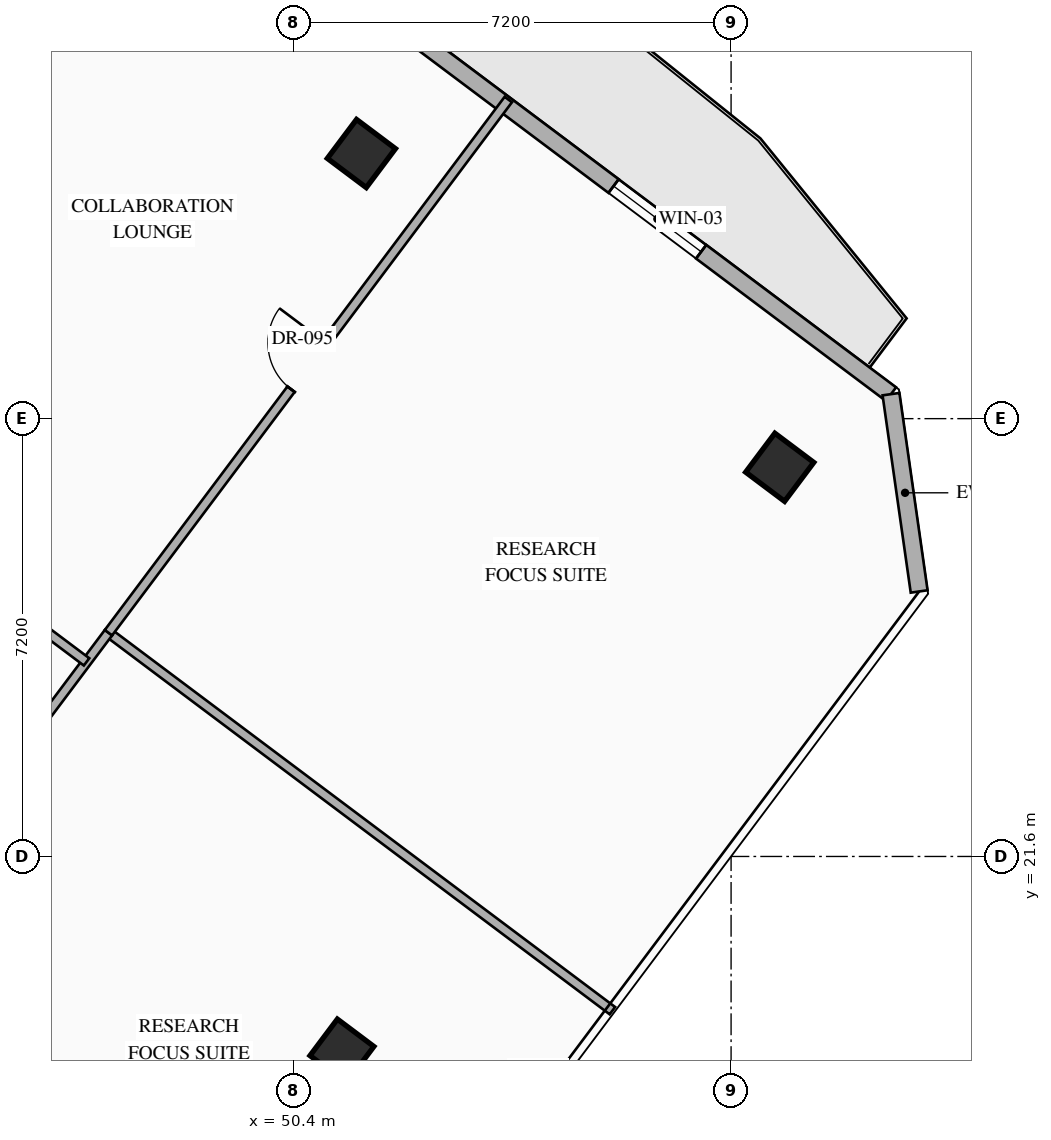
"""IFC4 building model, lengths in metres.
Left out: names, types, materials, properties, quantities, classifications, styles, units other than length and angle.
Written with IfcOpenShell. Run it as: python <this file> out.ifc"""

import sys

from ifc_helpers import new_model, si_unit, direction, frame, frame_2d, origin, origin_2d, place, context, subcontext, project, spatial, rectangle, hollow_rectangle, extrude, element, fill, save


model = new_model("IFC4")
c1 = context("Model", 3, precision=1e-05, world=origin(), true_north=direction((0.0, 1.0)))
c2 = subcontext(c1, "Body", "Model", "MODEL_VIEW")
j1 = project(units=[si_unit("LENGTHUNIT", "METRE"), si_unit("PLANEANGLEUNIT", "RADIAN")], contexts=[c1])
p1 = place(None, origin())
s1 = spatial("IfcSite", under=j1, at=p1, CompositionType="ELEMENT")
p2 = place(p1, origin())
s2 = spatial("IfcBuilding", under=s1, at=p2, CompositionType="ELEMENT")
p3 = place(p2, frame((0.0, 0.0, 174.45)))
s3 = spatial("IfcBuildingStorey", under=s2, at=p3, CompositionType="ELEMENT", Elevation=174.45)
for number, where, z_axis, x_axis in (
    (1, (51.52, 33.16, 0.0), (0.0, 0.0, 1.0), (0.8, -0.6, 0.0)),
    (2, (58.4, 28.0, 0.0), (0.0, 0.0, 1.0), (0.8, -0.6, 0.0)),
):
    element("IfcColumn", number, at=place(p3, frame(where, z_axis=z_axis, x_axis=x_axis)), inside=s3, PredefinedType="COLUMN", context=c2, shape_type="SweptSolid", body=[
        extrude(hollow_rectangle(XDim=0.8, YDim=0.8, WallThickness=0.032, at=origin_2d()), origin(), (0.0, 0.0, 1.0), 3.6),
    ])
p4 = place(p3, frame((51.2, 18.4, 0.0), z_axis=(0.0, 0.0, 1.0), x_axis=(0.799999996291, -0.600000004945, 0.0)))
e3 = element("IfcColumn", 3, at=p4, inside=s3, PredefinedType="COLUMN", context=c2, shape_type="SweptSolid", body=[
    extrude(hollow_rectangle(XDim=0.75, YDim=0.75, WallThickness=0.028, at=origin_2d()), origin(), (0.0, 0.0, 1.0), 3.6),
])
p5 = place(p3, frame((44.86, 40.73, 0.0), z_axis=(0.0, 0.0, 1.0), x_axis=(0.800007624502, -0.599989833863, 0.0)))
e4 = element("IfcWall", 4, at=p5, inside=s3, PredefinedType="STANDARD", context=c2, shape_type="SweptSolid", body=[
    extrude(rectangle(XDim=19.212, YDim=0.28, at=frame_2d((9.606, 0.0))), origin(), (0.0, 0.0, 1.0), 3.35),
])
p6 = place(p5, frame((1.755, 0.0, 0.0)))
e5 = element("IfcOpeningElement", 5, at=p6, cuts=e4, PredefinedType="OPENING", context=c2, shape_type="SweptSolid", body=[
    extrude(rectangle(XDim=1.1, YDim=2.2, at=frame_2d((0.55, 1.1))), frame((0.0, 0.15, 0.0), z_axis=(0.0, -1.0, 0.0), x_axis=(1.0, 0.0, 0.0)), (0.0, 0.0, 1.0), 0.3),
])
p7 = place(p5, frame((13.509, 0.0, 0.85)))
e6 = element("IfcOpeningElement", 6, at=p7, cuts=e4, PredefinedType="OPENING", context=c2, shape_type="SweptSolid", body=[
    extrude(rectangle(XDim=1.8, YDim=2.1, at=frame_2d((0.9, 1.05))), frame((0.0, 0.15, 0.0), z_axis=(0.0, -1.0, 0.0), x_axis=(1.0, 0.0, 0.0)), (0.0, 0.0, 1.0), 0.3),
])
p8 = place(p3, frame((60.23, 29.203, 0.0), z_axis=(0.0, 0.0, 1.0), x_axis=(0.141296221922, -0.989967361922, 0.0)))
e7 = element("IfcWall", 7, at=p8, inside=s3, PredefinedType="STANDARD", context=c2, shape_type="SweptSolid", body=[
    extrude(rectangle(XDim=3.278, YDim=0.28, at=frame_2d((1.639, 0.0))), origin(), (0.0, 0.0, 1.0), 3.35),
])
p9 = place(p3, frame((47.36, 25.28, 0.0), z_axis=(0.0, 0.0, 1.0), x_axis=(0.799991516197, -0.600011311571, 0.0)))
e8 = element("IfcWall", 8, at=p9, inside=s3, PredefinedType="PARTITIONING", context=c2, shape_type="SweptSolid", body=[
    extrude(rectangle(XDim=10.36, YDim=0.15, at=frame_2d((5.18, 0.0))), origin(), (0.0, 0.0, 1.0), 3.35),
])
p10 = place(p3, frame((41.87, 17.96, 0.0), z_axis=(0.0, 0.0, 1.0), x_axis=(0.599995730889, 0.800003201816, 0.0)))
e9 = element("IfcWall", 9, at=p10, inside=s3, PredefinedType="PARTITIONING", context=c2, shape_type="SweptSolid", body=[
    extrude(rectangle(XDim=9.15, YDim=0.15, at=frame_2d((4.575, 0.0))), origin(), (0.0, 0.0, 1.0), 3.35),
])
p11 = place(p10, frame((4.1, 0.0, 0.0)))
e10 = element("IfcOpeningElement", 10, at=p11, cuts=e9, PredefinedType="OPENING", context=c2, shape_type="SweptSolid", body=[
    extrude(rectangle(XDim=0.95, YDim=2.15, at=frame_2d((0.475, 1.075))), frame((0.0, 0.085, 0.0), z_axis=(0.0, -1.0, 0.0), x_axis=(1.0, 0.0, 0.0)), (0.0, 0.0, 1.0), 0.17),
])
p12 = place(p3, frame((47.36, 25.28, 0.0), z_axis=(0.0, 0.0, 1.0), x_axis=(0.599992871789, 0.800005346109, 0.0)))
e11 = element("IfcWall", 11, at=p12, inside=s3, PredefinedType="PARTITIONING", context=c2, shape_type="SweptSolid", body=[
    extrude(rectangle(XDim=10.96, YDim=0.15, at=frame_2d((5.48, 0.0))), origin(), (0.0, 0.0, 1.0), 3.35),
])
p13 = place(p12, frame((5.005, 0.0, 0.0)))
e12 = element("IfcOpeningElement", 12, at=p13, cuts=e11, PredefinedType="OPENING", context=c2, shape_type="SweptSolid", body=[
    extrude(rectangle(XDim=0.95, YDim=2.15, at=frame_2d((0.475, 1.075))), frame((0.0, 0.085, 0.0), z_axis=(0.0, -1.0, 0.0), x_axis=(1.0, 0.0, 0.0)), (0.0, 0.0, 1.0), 0.17),
])
p14 = place(p3, frame((43.63, 27.328, 0.0), z_axis=(0.0, 0.0, 1.0), x_axis=(0.799972182084, -0.600037088764, 0.0)))
e13 = element("IfcWall", 13, at=p14, inside=s3, PredefinedType="PARTITIONING", context=c2, shape_type="SweptSolid", body=[
    extrude(rectangle(XDim=4.213, YDim=0.15, at=frame_2d((2.106, 0.0))), origin(), (0.0, 0.0, 1.0), 3.045),
])
p15 = place(p14, frame((1.256, 0.0, 0.0)))
e14 = element("IfcOpeningElement", 14, at=p15, cuts=e13, PredefinedType="OPENING", context=c2, shape_type="SweptSolid", body=[
    extrude(rectangle(XDim=0.95, YDim=2.15, at=frame_2d((0.475, 1.075))), frame((0.0, 0.085, 0.0), z_axis=(0.0, -1.0, 0.0), x_axis=(1.0, 0.0, 0.0)), (0.0, 0.0, 1.0), 0.17),
])
p16 = place(p3, frame((43.63, 31.973, 0.0), z_axis=(0.0, 0.0, 1.0), x_axis=(0.599975099311, 0.800018674911, 0.0)))
e15 = element("IfcWall", 15, at=p16, inside=s3, PredefinedType="PARTITIONING", context=c2, shape_type="SweptSolid", body=[
    extrude(rectangle(XDim=7.844, YDim=0.15, at=frame_2d((3.922, 0.0))), origin(), (0.0, 0.0, 1.0), 3.35),
])
p17 = place(p7, origin())
e16 = element("IfcWindow", 16, at=p17, inside=s3, PartitioningType="SINGLE_PANEL", PredefinedType="WINDOW", context=c2, shape_type="SweptSolid", body=[
    extrude(rectangle(XDim=1.8, YDim=2.1, at=frame_2d((0.9, 1.05))), frame((0.0, 0.03, 0.0), z_axis=(0.0, -1.0, 0.0), x_axis=(1.0, 0.0, 0.0)), (0.0, 0.0, 1.0), 0.06),
])
fill(e6, e16)
p18 = place(p13, origin())
e17 = element("IfcDoor", 17, at=p18, inside=s3, OperationType="SINGLE_SWING_RIGHT", PredefinedType="DOOR", context=c2, shape_type="SweptSolid", body=[
    extrude(rectangle(XDim=0.95, YDim=2.15, at=frame_2d((0.475, 1.075))), frame((0.0, 0.025, 0.0), z_axis=(0.0, -1.0, 0.0), x_axis=(1.0, 0.0, 0.0)), (0.0, 0.0, 1.0), 0.05),
])
fill(e12, e17)
save(model, sys.argv[1])
